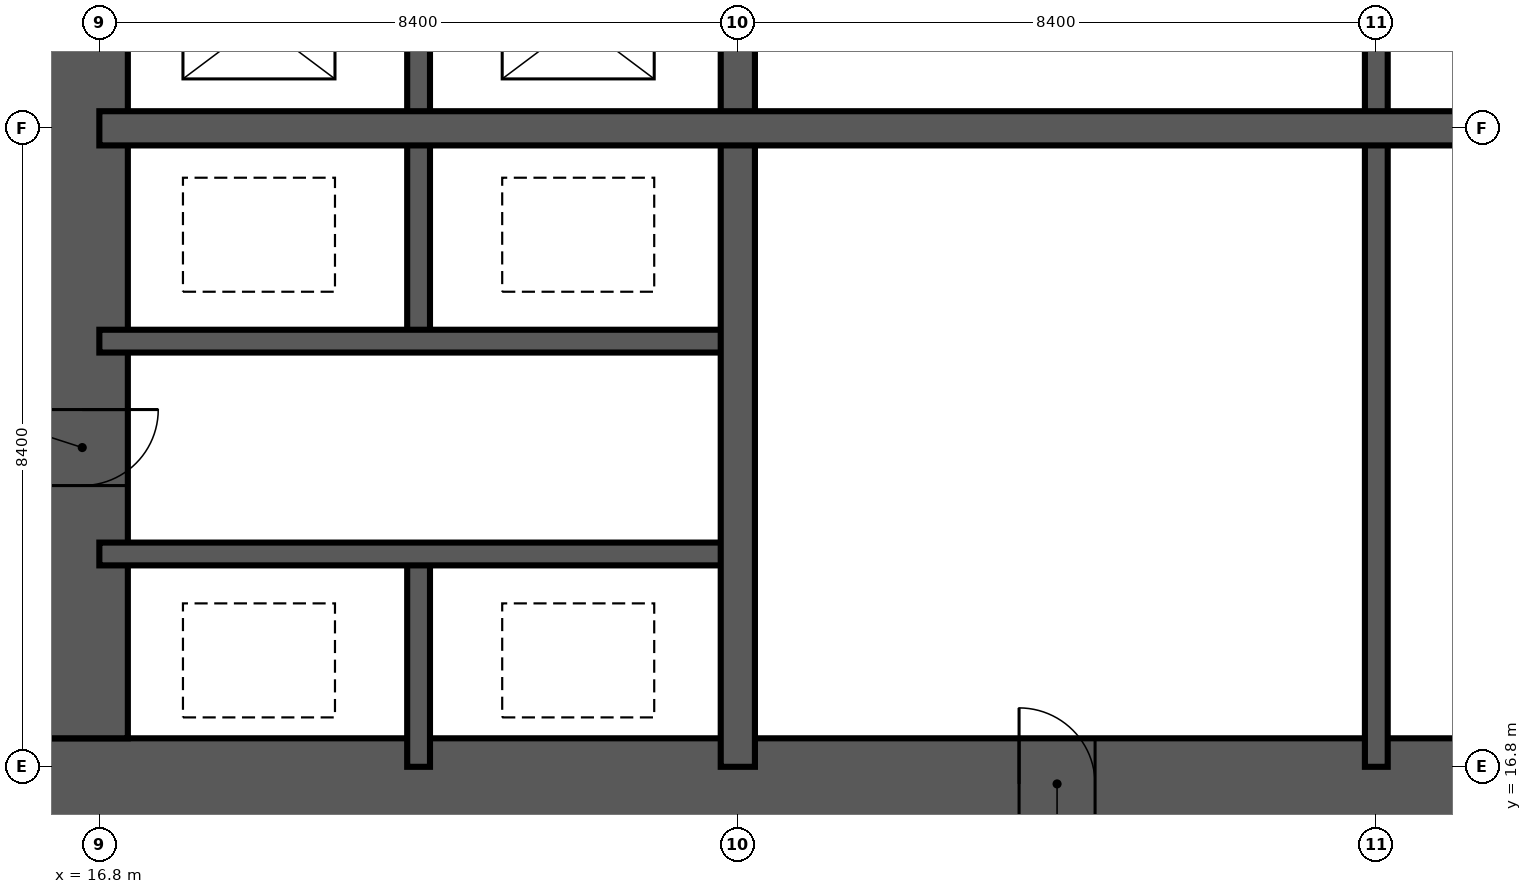
"""IFC4 building model, lengths in metres.
Left out: names, types, materials, properties, quantities, classifications, styles, units other than length and angle.
Written with IfcOpenShell. Run it as: python <this file> out.ifc"""

import sys

from ifc_helpers import new_model, si_unit, direction, frame, frame_2d, origin, place, context, subcontext, project, spatial, rectangle, extrude, element, fill, save


model = new_model("IFC4")
c1 = context("Model", 3, precision=1e-05, world=origin(), true_north=direction((0.0, 1.0)))
c2 = subcontext(c1, "Body", "Model", "MODEL_VIEW")
j1 = project(units=[si_unit("LENGTHUNIT", "METRE"), si_unit("PLANEANGLEUNIT", "RADIAN")], contexts=[c1])
p1 = place(None, origin())
s1 = spatial("IfcSite", under=j1, at=p1, CompositionType="ELEMENT")
p2 = place(p1, origin())
s2 = spatial("IfcBuilding", under=s1, at=p2, CompositionType="ELEMENT")
p3 = place(p2, frame((0.0, 0.0, 100.8)))
s3 = spatial("IfcBuildingStorey", under=s2, at=p3, CompositionType="ELEMENT", Elevation=100.8)
p4 = place(p3, frame((15.975, 16.575, -0.35), z_axis=(0.0, 0.0, 1.0), x_axis=(1.0, 0.0, 0.0)))
e1 = element("IfcWall", 1, at=p4, inside=s3, PredefinedType="SHEAR", context=c2, shape_type="SweptSolid", body=[
    extrude(rectangle(XDim=26.85, YDim=1.2, at=frame_2d((13.425, 0.0))), origin(), (0.0, 0.0, 1.0), 3.6),
])
p5 = place(p4, frame((12.925, 0.0, 0.35)))
e2 = element("IfcOpeningElement", 2, at=p5, cuts=e1, PredefinedType="OPENING", context=c2, shape_type="SweptSolid", body=[
    extrude(rectangle(XDim=1.0, YDim=2.1, at=frame_2d((0.5, 1.05))), frame((0.0, 0.61, 0.0), z_axis=(0.0, -1.0, 0.0), x_axis=(1.0, 0.0, 0.0)), (0.0, 0.0, 1.0), 1.22),
])
p6 = place(p4, frame((19.225, 0.0, 0.35)))
e3 = element("IfcOpeningElement", 3, at=p6, cuts=e1, PredefinedType="OPENING", context=c2, shape_type="SweptSolid", body=[
    extrude(rectangle(XDim=1.0, YDim=2.1, at=frame_2d((0.5, 1.05))), frame((0.0, 0.61, 0.0), z_axis=(0.0, -1.0, 0.0), x_axis=(1.0, 0.0, 0.0)), (0.0, 0.0, 1.0), 1.22),
])
p7 = place(p3, frame((16.575, 41.625, -0.35), z_axis=(0.0, 0.0, 1.0), x_axis=(0.0, -1.0, 0.0)))
e4 = element("IfcWall", 4, at=p7, inside=s3, PredefinedType="SHEAR", context=c2, shape_type="SweptSolid", body=[
    extrude(rectangle(XDim=24.45, YDim=1.2, at=frame_2d((12.225, 0.0))), origin(), (0.0, 0.0, 1.0), 3.6),
])
p8 = place(p7, frame((11.325, 0.0, 0.35)))
e5 = element("IfcOpeningElement", 5, at=p8, cuts=e4, PredefinedType="OPENING", context=c2, shape_type="SweptSolid", body=[
    extrude(rectangle(XDim=1.8, YDim=2.2, at=frame_2d((0.9, 1.1))), frame((0.0, 0.61, 0.0), z_axis=(0.0, -1.0, 0.0), x_axis=(1.0, 0.0, 0.0)), (0.0, 0.0, 1.0), 1.22),
])
p9 = place(p7, frame((20.125, 0.0, 0.35)))
e6 = element("IfcOpeningElement", 6, at=p9, cuts=e4, PredefinedType="OPENING", context=c2, shape_type="SweptSolid", body=[
    extrude(rectangle(XDim=1.0, YDim=2.1, at=frame_2d((0.5, 1.05))), frame((0.0, 0.61, 0.0), z_axis=(0.0, -1.0, 0.0), x_axis=(1.0, 0.0, 0.0)), (0.0, 0.0, 1.0), 1.22),
])
p10 = place(p7, frame((5.425, 0.0, 0.35)))
e7 = element("IfcOpeningElement", 7, at=p10, cuts=e4, PredefinedType="OPENING", context=c2, shape_type="SweptSolid", body=[
    extrude(rectangle(XDim=1.0, YDim=2.1, at=frame_2d((0.5, 1.05))), frame((0.0, 0.61, 0.0), z_axis=(0.0, -1.0, 0.0), x_axis=(1.0, 0.0, 0.0)), (0.0, 0.0, 1.0), 1.22),
])
p11 = place(p3, frame((21.0, 16.8, -0.35), z_axis=(0.0, 0.0, 1.0), x_axis=(0.0, 1.0, 0.0)))
e8 = element("IfcWall", 8, at=p11, inside=s3, PredefinedType="SHEAR", context=c2, shape_type="SweptSolid", body=[
    extrude(rectangle(XDim=2.8, YDim=0.3, at=frame_2d((1.4, 0.0))), origin(), (0.0, 0.0, 1.0), 3.6),
])
p12 = place(p3, frame((21.0, 22.4, -0.35), z_axis=(0.0, 0.0, 1.0), x_axis=(0.0, 1.0, 0.0)))
e9 = element("IfcWall", 9, at=p12, inside=s3, PredefinedType="SHEAR", context=c2, shape_type="SweptSolid", body=[
    extrude(rectangle(XDim=5.6, YDim=0.3, at=frame_2d((2.8, 0.0))), origin(), (0.0, 0.0, 1.0), 3.6),
])
p13 = place(p3, frame((33.6, 16.8, -0.35), z_axis=(0.0, 0.0, 1.0), x_axis=(0.0, 1.0, 0.0)))
e10 = element("IfcWall", 10, at=p13, inside=s3, PredefinedType="SHEAR", context=c2, shape_type="SweptSolid", body=[
    extrude(rectangle(XDim=25.2, YDim=0.3, at=frame_2d((12.6, 0.0))), origin(), (0.0, 0.0, 1.0), 3.6),
])
p14 = place(p13, frame((22.5, 0.0, 0.35)))
e11 = element("IfcOpeningElement", 11, at=p14, cuts=e10, PredefinedType="OPENING", context=c2, shape_type="SweptSolid", body=[
    extrude(rectangle(XDim=1.2, YDim=2.2, at=frame_2d((0.6, 1.1))), frame((0.0, 0.16, 0.0), z_axis=(0.0, -1.0, 0.0), x_axis=(1.0, 0.0, 0.0)), (0.0, 0.0, 1.0), 0.32),
])
p15 = place(p13, frame((18.3, 0.0, 0.35)))
e12 = element("IfcOpeningElement", 12, at=p15, cuts=e10, PredefinedType="OPENING", context=c2, shape_type="SweptSolid", body=[
    extrude(rectangle(XDim=1.2, YDim=2.2, at=frame_2d((0.6, 1.1))), frame((0.0, 0.16, 0.0), z_axis=(0.0, -1.0, 0.0), x_axis=(1.0, 0.0, 0.0)), (0.0, 0.0, 1.0), 0.32),
])
for number, where, z_axis, x_axis in (
    (13, (16.8, 19.6, -0.35), (0.0, 0.0, 1.0), (1.0, 0.0, 0.0)),
    (14, (16.8, 22.4, -0.35), (0.0, 0.0, 1.0), (1.0, 0.0, 0.0)),
):
    element("IfcWall", number, at=place(p3, frame(where, z_axis=z_axis, x_axis=x_axis)), inside=s3, PredefinedType="SHEAR", context=c2, shape_type="SweptSolid", body=[
        extrude(rectangle(XDim=8.4, YDim=0.3, at=frame_2d((4.2, 0.0))), origin(), (0.0, 0.0, 1.0), 3.6),
    ])
p16 = place(p3, frame((25.2, 16.8, -0.35), z_axis=(0.0, 0.0, 1.0), x_axis=(0.0, 1.0, 0.0)))
e15 = element("IfcWall", 15, at=p16, inside=s3, PredefinedType="SHEAR", context=c2, shape_type="SweptSolid", body=[
    extrude(rectangle(XDim=25.2, YDim=0.45, at=frame_2d((12.6, 0.0))), origin(), (0.0, 0.0, 1.0), 3.6),
])
p17 = place(p16, frame((12.1, 0.0, 0.35)))
e16 = element("IfcOpeningElement", 16, at=p17, cuts=e15, PredefinedType="OPENING", context=c2, shape_type="SweptSolid", body=[
    extrude(rectangle(XDim=1.0, YDim=2.1, at=frame_2d((0.5, 1.05))), frame((0.0, 0.235, 0.0), z_axis=(0.0, -1.0, 0.0), x_axis=(1.0, 0.0, 0.0)), (0.0, 0.0, 1.0), 0.47),
])
p18 = place(p3, frame((16.8, 25.2, -0.35), z_axis=(0.0, 0.0, 1.0), x_axis=(1.0, 0.0, 0.0)))
e17 = element("IfcWall", 17, at=p18, inside=s3, PredefinedType="SHEAR", context=c2, shape_type="SweptSolid", body=[
    extrude(rectangle(XDim=25.2, YDim=0.45, at=frame_2d((12.6, 0.0))), origin(), (0.0, 0.0, 1.0), 3.6),
])
p19 = place(p9, origin())
e18 = element("IfcDoor", 18, at=p19, inside=s3, OperationType="SINGLE_SWING_LEFT", PredefinedType="DOOR", context=c2, shape_type="SweptSolid", body=[
    extrude(rectangle(XDim=1.0, YDim=2.1, at=frame_2d((0.5, 1.05))), frame((0.0, 0.025, 0.0), z_axis=(0.0, -1.0, 0.0), x_axis=(1.0, 0.0, 0.0)), (0.0, 0.0, 1.0), 0.05),
])
fill(e6, e18)
p20 = place(p5, origin())
e19 = element("IfcDoor", 19, at=p20, inside=s3, OperationType="SINGLE_SWING_LEFT", PredefinedType="DOOR", context=c2, shape_type="SweptSolid", body=[
    extrude(rectangle(XDim=1.0, YDim=2.1, at=frame_2d((0.5, 1.05))), frame((0.0, 0.025, 0.0), z_axis=(0.0, -1.0, 0.0), x_axis=(1.0, 0.0, 0.0)), (0.0, 0.0, 1.0), 0.05),
])
fill(e2, e19)
save(model, sys.argv[1])
